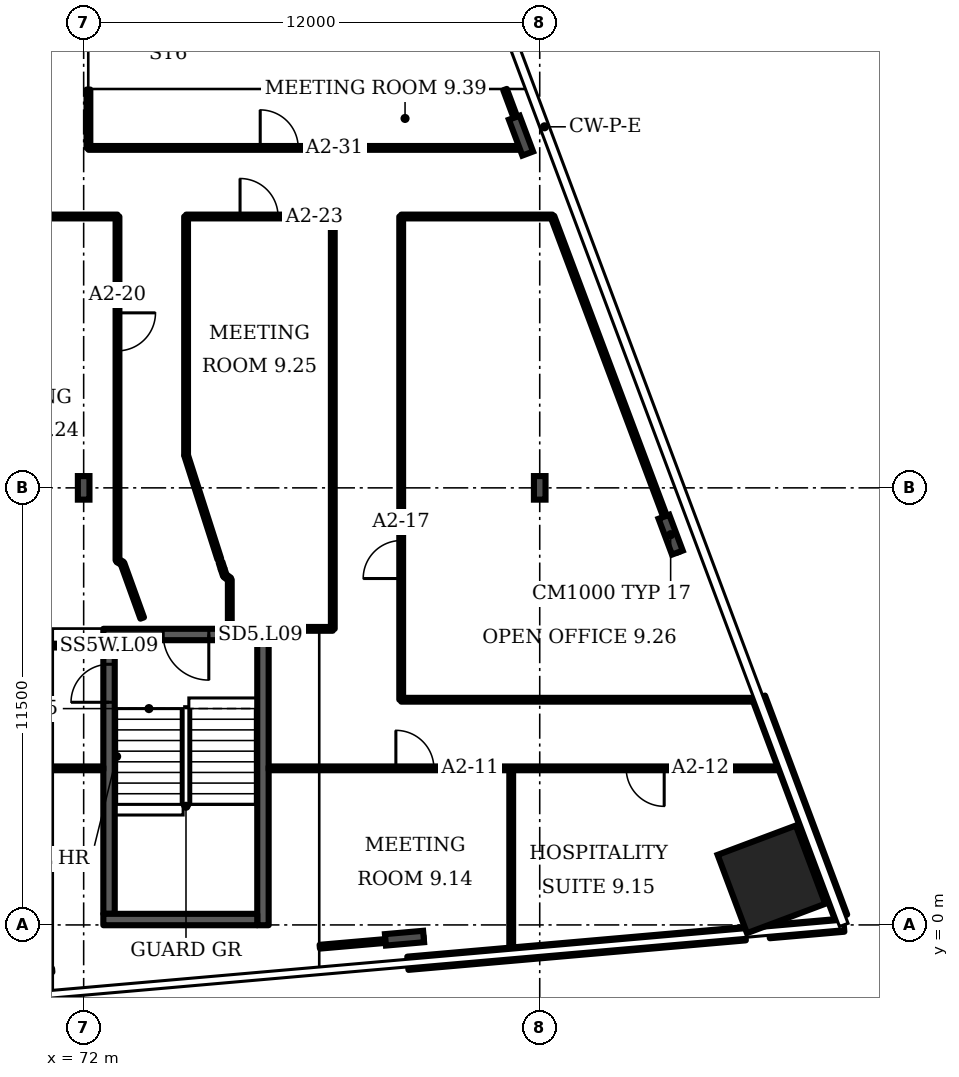
"""IFC4 building model, lengths in metres.
Left out: names, types, materials, properties, quantities, classifications, styles, units other than length and angle.
Written with IfcOpenShell. Run it as: python <this file> out.ifc"""

import sys

from ifc_helpers import new_model, si_unit, direction, frame, frame_2d, origin, origin_2d, place, context, subcontext, project, spatial, rectangle, i_section, extrude, element, fill, save


model = new_model("IFC4")
c1 = context("Model", 3, precision=1e-05, world=origin(), true_north=direction((0.0, 1.0)))
c2 = subcontext(c1, "Body", "Model", "MODEL_VIEW")
j1 = project(units=[si_unit("LENGTHUNIT", "METRE"), si_unit("PLANEANGLEUNIT", "RADIAN")], contexts=[c1])
p1 = place(None, origin())
s1 = spatial("IfcSite", under=j1, at=p1, CompositionType="ELEMENT")
p2 = place(p1, origin())
s2 = spatial("IfcBuilding", under=s1, at=p2, CompositionType="ELEMENT")
p3 = place(p2, frame((0.0, 0.0, 52.3)))
s3 = spatial("IfcBuildingStorey", under=s2, at=p3, CompositionType="ELEMENT", Elevation=52.3)
p4 = place(p3, frame((90.096, 1.2, 0.0), z_axis=(0.0, 0.0, 1.0), x_axis=(-0.351123, 0.936328, 0.0)))
e1 = element("IfcColumn", 1, at=p4, inside=s3, PredefinedType="COLUMN", context=c2, shape_type="SweptSolid", body=[
    extrude(rectangle(XDim=2.2, YDim=2.2, at=origin_2d()), origin(), (0.0, 0.0, 1.0), 3.6),
])
for number, where, z_axis, x_axis in (
    (2, (80.442, -0.349, 0.0), (0.0, 0.0, 1.0), (0.087, -0.996, 0.0)),
    (3, (87.445, 10.268, 0.0), (0.0, 0.0, 1.0), (0.936, 0.351, 0.0)),
    (4, (83.507, 20.768, 0.0), (0.0, 0.0, 1.0), (0.936, 0.351, 0.0)),
):
    element("IfcColumn", number, at=place(p3, frame(where, z_axis=z_axis, x_axis=x_axis)), inside=s3, PredefinedType="COLUMN", context=c2, shape_type="SweptSolid", body=[
        extrude(i_section(OverallWidth=0.302, OverallDepth=1.008, WebThickness=0.021, FlangeThickness=0.04, FilletRadius=0.03, at=origin_2d()), origin(), (0.0, 0.0, 1.0), 3.6),
    ])
for number, where, z_axis, x_axis in (
    (5, (72.0, 11.5, 0.0), (0.0, 0.0, 1.0), (1.0, 0.0, 0.0)),
    (6, (84.0, 11.5, 0.0), (0.0, 0.0, 1.0), (1.0, 0.0, 0.0)),
):
    element("IfcColumn", number, at=place(p3, frame(where, z_axis=z_axis, x_axis=x_axis)), inside=s3, PredefinedType="COLUMN", context=c2, shape_type="SweptSolid", body=[
        extrude(i_section(OverallWidth=0.305, OverallDepth=0.62, WebThickness=0.021, FlangeThickness=0.04, FilletRadius=0.027, at=origin_2d()), origin(), (0.0, 0.0, 1.0), 3.6),
    ])
p5 = place(p3, frame((80.53, -1.009, 0.0), z_axis=(0.0, 0.0, 1.0), x_axis=(0.996198, 0.087169, 0.0)))
e7 = element("IfcWall", 7, at=p5, inside=s3, PredefinedType="SOLIDWALL", context=c2, shape_type="SweptSolid", body=[
    extrude(rectangle(XDim=8.912, YDim=0.35, at=frame_2d((4.456, 0.0))), origin(), (0.0, 0.0, 1.0), 1.0),
])
p6 = place(p3, frame((90.039, -0.177, 0.0), z_axis=(0.0, 0.0, 1.0), x_axis=(0.996193, 0.08717, 0.0)))
e8 = element("IfcWall", 8, at=p6, inside=s3, PredefinedType="SOLIDWALL", context=c2, shape_type="SweptSolid", body=[
    extrude(rectangle(XDim=1.969, YDim=0.35, at=frame_2d((0.984, 0.0))), origin(), (0.0, 0.0, 1.0), 1.0),
])
p7 = place(p3, frame((91.926, 0.211, 0.0), z_axis=(0.0, 0.0, 1.0), x_axis=(-0.351118, 0.936328, 0.0)))
e9 = element("IfcWall", 9, at=p7, inside=s3, PredefinedType="SOLIDWALL", context=c2, shape_type="SweptSolid", body=[
    extrude(rectangle(XDim=6.154, YDim=0.35, at=frame_2d((3.077, 0.0))), origin(), (0.0, 0.0, 1.0), 1.0),
])
p8 = place(p3, frame((72.518, 7.642, 0.0), z_axis=(0.0, 0.0, 1.0), x_axis=(1.0, 0.0, 0.0)))
e10 = element("IfcWall", 10, at=p8, inside=s3, PredefinedType="SHEAR", context=c2, shape_type="SweptSolid", body=[
    extrude(rectangle(XDim=4.35, YDim=0.3, at=frame_2d((2.175, 0.0))), origin(), (0.0, 0.0, 1.0), 3.2),
])
p9 = place(p8, frame((1.575, 0.0, 0.0)))
e11 = element("IfcOpeningElement", 11, at=p9, cuts=e10, PredefinedType="OPENING", context=c2, shape_type="SweptSolid", body=[
    extrude(rectangle(XDim=1.2, YDim=2.1, at=frame_2d((0.6, 1.05))), frame((0.0, 0.16, 0.0), z_axis=(0.0, -1.0, 0.0), x_axis=(1.0, 0.0, 0.0)), (0.0, 0.0, 1.0), 0.32),
])
p10 = place(p3, frame((72.667, 0.292, 0.0), z_axis=(0.0, 0.0, 1.0), x_axis=(0.0, 1.0, 0.0)))
e12 = element("IfcWall", 12, at=p10, inside=s3, PredefinedType="SHEAR", context=c2, shape_type="SweptSolid", body=[
    extrude(rectangle(XDim=7.2, YDim=0.3, at=frame_2d((3.6, 0.0))), origin(), (0.0, 0.0, 1.0), 3.2),
])
p11 = place(p10, frame((5.566, 0.0, 0.0)))
e13 = element("IfcOpeningElement", 13, at=p11, cuts=e12, PredefinedType="OPENING", context=c2, shape_type="SweptSolid", body=[
    extrude(rectangle(XDim=1.0, YDim=2.1, at=frame_2d((0.5, 1.05))), frame((0.0, 0.16, 0.0), z_axis=(0.0, -1.0, 0.0), x_axis=(1.0, 0.0, 0.0)), (0.0, 0.0, 1.0), 0.32),
])
p12 = place(p3, frame((39.55, 18.64, 0.0), z_axis=(0.0, 0.0, 1.0), x_axis=(1.0, 0.0, 0.0)))
e14 = element("IfcWall", 14, at=p12, inside=s3, PredefinedType="PARTITIONING", context=c2, shape_type="SweptSolid", body=[
    extrude(rectangle(XDim=33.34, YDim=0.1, at=frame_2d((16.67, 0.0))), origin(), (0.0, 0.0, 1.0), 3.2),
])
p13 = place(p12, frame((4.645, 0.0, 0.0)))
e15 = element("IfcOpeningElement", 15, at=p13, cuts=e14, PredefinedType="OPENING", context=c2, shape_type="SweptSolid", body=[
    extrude(rectangle(XDim=1.0, YDim=2.1, at=frame_2d((0.5, 1.05))), frame((0.0, 0.06, 0.0), z_axis=(0.0, -1.0, 0.0), x_axis=(1.0, 0.0, 0.0)), (0.0, 0.0, 1.0), 0.12),
])
p14 = place(p3, frame((41.558, 4.12, 0.0), z_axis=(0.0, 0.0, 1.0), x_axis=(1.0, 0.0, 0.0)))
e16 = element("IfcWall", 16, at=p14, inside=s3, PredefinedType="PARTITIONING", context=c2, shape_type="SweptSolid", body=[
    extrude(rectangle(XDim=30.959, YDim=0.1, at=frame_2d((15.479, 0.0))), origin(), (0.0, 0.0, 1.0), 3.2),
])
p15 = place(p14, frame((2.952, 0.0, 0.0)))
e17 = element("IfcOpeningElement", 17, at=p15, cuts=e16, PredefinedType="OPENING", context=c2, shape_type="SweptSolid", body=[
    extrude(rectangle(XDim=1.0, YDim=2.1, at=frame_2d((0.5, 1.05))), frame((0.0, 0.06, 0.0), z_axis=(0.0, -1.0, 0.0), x_axis=(1.0, 0.0, 0.0)), (0.0, 0.0, 1.0), 0.12),
])
p16 = place(p14, frame((7.387, 0.0, 0.0)))
e18 = element("IfcOpeningElement", 18, at=p16, cuts=e16, PredefinedType="OPENING", context=c2, shape_type="SweptSolid", body=[
    extrude(rectangle(XDim=1.0, YDim=2.1, at=frame_2d((0.5, 1.05))), frame((0.0, 0.06, 0.0), z_axis=(0.0, -1.0, 0.0), x_axis=(1.0, 0.0, 0.0)), (0.0, 0.0, 1.0), 0.12),
])
p17 = place(p14, frame((15.417, 0.0, 0.0)))
e19 = element("IfcOpeningElement", 19, at=p17, cuts=e16, PredefinedType="OPENING", context=c2, shape_type="SweptSolid", body=[
    extrude(rectangle(XDim=1.0, YDim=2.1, at=frame_2d((0.5, 1.05))), frame((0.0, 0.06, 0.0), z_axis=(0.0, -1.0, 0.0), x_axis=(1.0, 0.0, 0.0)), (0.0, 0.0, 1.0), 0.12),
])
p18 = place(p14, frame((25.117, 0.0, 0.0)))
e20 = element("IfcOpeningElement", 20, at=p18, cuts=e16, PredefinedType="OPENING", context=c2, shape_type="SweptSolid", body=[
    extrude(rectangle(XDim=1.0, YDim=2.1, at=frame_2d((0.5, 1.05))), frame((0.0, 0.06, 0.0), z_axis=(0.0, -1.0, 0.0), x_axis=(1.0, 0.0, 0.0)), (0.0, 0.0, 1.0), 0.12),
])
p19 = place(p3, frame((68.445, -1.43, 0.0), z_axis=(0.0, 0.0, 1.0), x_axis=(0.996195, 0.087118, 0.0)))
e21 = element("IfcWall", 21, at=p19, inside=s3, PredefinedType="PARTITIONING", context=c2, shape_type="SweptSolid", body=[
    extrude(rectangle(XDim=2.738, YDim=0.1, at=frame_2d((1.369, 0.0))), origin(), (0.0, 0.0, 1.0), 2.58),
])
p20 = place(p3, frame((69.765, 7.35, 0.0), z_axis=(0.0, 0.0, 1.0), x_axis=(1.0, 0.0, 0.0)))
e22 = element("IfcWall", 22, at=p20, inside=s3, PredefinedType="PARTITIONING", context=c2, shape_type="SweptSolid", body=[
    extrude(rectangle(XDim=2.753, YDim=0.1, at=frame_2d((1.376, 0.0))), origin(), (0.0, 0.0, 1.0), 3.2),
])
p21 = place(p3, frame((72.125, 20.445, 0.0), z_axis=(0.0, 0.0, 1.0), x_axis=(0.0, 1.0, 0.0)))
e23 = element("IfcWall", 23, at=p21, inside=s3, PredefinedType="PARTITIONING", context=c2, shape_type="SweptSolid", body=[
    extrude(rectangle(XDim=1.535, YDim=0.1, at=frame_2d((0.768, 0.0))), origin(), (0.0, 0.0, 1.0), 3.2),
])
p22 = place(p3, frame((72.125, 20.445, 0.0), z_axis=(0.0, 0.0, 1.0), x_axis=(1.0, 0.0, 0.0)))
e24 = element("IfcWall", 24, at=p22, inside=s3, PredefinedType="PARTITIONING", context=c2, shape_type="SweptSolid", body=[
    extrude(rectangle(XDim=11.535, YDim=0.1, at=frame_2d((5.768, 0.0))), origin(), (0.0, 0.0, 1.0), 3.2),
])
p23 = place(p22, frame((4.521, 0.0, 0.0)))
e25 = element("IfcOpeningElement", 25, at=p23, cuts=e24, PredefinedType="OPENING", context=c2, shape_type="SweptSolid", body=[
    extrude(rectangle(XDim=1.0, YDim=2.1, at=frame_2d((0.5, 1.05))), frame((0.0, 0.06, 0.0), z_axis=(0.0, -1.0, 0.0), x_axis=(1.0, 0.0, 0.0)), (0.0, 0.0, 1.0), 0.12),
])
p24 = place(p3, frame((72.89, 9.59, 0.0), z_axis=(0.0, 0.0, 1.0), x_axis=(0.0, 1.0, 0.0)))
e26 = element("IfcWall", 26, at=p24, inside=s3, PredefinedType="PARTITIONING", context=c2, shape_type="SweptSolid", body=[
    extrude(rectangle(XDim=9.05, YDim=0.1, at=frame_2d((4.525, 0.0))), origin(), (0.0, 0.0, 1.0), 3.2),
])
p25 = place(p24, frame((5.515, 0.0, 0.0)))
e27 = element("IfcOpeningElement", 27, at=p25, cuts=e26, PredefinedType="OPENING", context=c2, shape_type="SweptSolid", body=[
    extrude(rectangle(XDim=1.0, YDim=2.1, at=frame_2d((0.5, 1.05))), frame((0.0, 0.06, 0.0), z_axis=(0.0, -1.0, 0.0), x_axis=(1.0, 0.0, 0.0)), (0.0, 0.0, 1.0), 0.12),
])
p26 = place(p3, frame((73.02, 9.515, 0.0), z_axis=(0.0, 0.0, 1.0), x_axis=(-0.865836, 0.500333, 0.0)))
e28 = element("IfcWall", 28, at=p26, inside=s3, PredefinedType="PARTITIONING", context=c2, shape_type="SweptSolid", body=[
    extrude(rectangle(XDim=0.15, YDim=0.1, at=frame_2d((0.075, 0.0))), origin(), (0.0, 0.0, 1.0), 3.2),
])
p27 = place(p3, frame((73.54, 8.075, 0.0), z_axis=(0.0, 0.0, 1.0), x_axis=(-0.339669, 0.940548, 0.0)))
e29 = element("IfcWall", 29, at=p27, inside=s3, PredefinedType="PARTITIONING", context=c2, shape_type="SweptSolid", body=[
    extrude(rectangle(XDim=1.531, YDim=0.1, at=frame_2d((0.766, 0.0))), origin(), (0.0, 0.0, 1.0), 3.2),
])
p28 = place(p3, frame((74.695, 12.36, 0.0), z_axis=(0.0, 0.0, 1.0), x_axis=(0.0, 1.0, 0.0)))
e30 = element("IfcWall", 30, at=p28, inside=s3, PredefinedType="PARTITIONING", context=c2, shape_type="SweptSolid", body=[
    extrude(rectangle(XDim=6.28, YDim=0.1, at=frame_2d((3.14, 0.0))), origin(), (0.0, 0.0, 1.0), 3.2),
])
p29 = place(p3, frame((74.695, 18.64, 0.0), z_axis=(0.0, 0.0, 1.0), x_axis=(1.0, 0.0, 0.0)))
e31 = element("IfcWall", 31, at=p29, inside=s3, PredefinedType="PARTITIONING", context=c2, shape_type="SweptSolid", body=[
    extrude(rectangle(XDim=3.86, YDim=0.1, at=frame_2d((1.93, 0.0))), origin(), (0.0, 0.0, 1.0), 3.2),
])
p30 = place(p29, frame((1.42, 0.0, 0.0)))
e32 = element("IfcOpeningElement", 32, at=p30, cuts=e31, PredefinedType="OPENING", context=c2, shape_type="SweptSolid", body=[
    extrude(rectangle(XDim=1.0, YDim=2.1, at=frame_2d((0.5, 1.05))), frame((0.0, 0.06, 0.0), z_axis=(0.0, -1.0, 0.0), x_axis=(1.0, 0.0, 0.0)), (0.0, 0.0, 1.0), 0.12),
])
p31 = place(p3, frame((75.57, 9.625, 0.0), z_axis=(0.0, 0.0, 1.0), x_axis=(-0.305088, 0.952327, 0.0)))
e33 = element("IfcWall", 33, at=p31, inside=s3, PredefinedType="PARTITIONING", context=c2, shape_type="SweptSolid", body=[
    extrude(rectangle(XDim=2.872, YDim=0.1, at=frame_2d((1.436, 0.0))), origin(), (0.0, 0.0, 1.0), 3.2),
])
p32 = place(p3, frame((75.655, 9.37, 0.0), z_axis=(0.0, 0.0, 1.0), x_axis=(-0.299793, 0.954008, 0.0)))
e34 = element("IfcWall", 34, at=p32, inside=s3, PredefinedType="PARTITIONING", context=c2, shape_type="SweptSolid", body=[
    extrude(rectangle(XDim=0.183, YDim=0.1, at=frame_2d((0.092, 0.0))), origin(), (0.0, 0.0, 1.0), 3.2),
])
p33 = place(p3, frame((75.715, 9.19, 0.0), z_axis=(0.0, 0.0, 1.0), x_axis=(-0.316228, 0.948684, 0.0)))
e35 = element("IfcWall", 35, at=p33, inside=s3, PredefinedType="PARTITIONING", context=c2, shape_type="SweptSolid", body=[
    extrude(rectangle(XDim=0.19, YDim=0.1, at=frame_2d((0.095, 0.0))), origin(), (0.0, 0.0, 1.0), 3.2),
])
p34 = place(p3, frame((75.845, 7.812, 0.0), z_axis=(0.0, 0.0, 1.0), x_axis=(0.0, 1.0, 0.0)))
e36 = element("IfcWall", 36, at=p34, inside=s3, PredefinedType="PARTITIONING", context=c2, shape_type="SweptSolid", body=[
    extrude(rectangle(XDim=1.278, YDim=0.1, at=frame_2d((0.639, 0.0))), origin(), (0.0, 0.0, 1.0), 3.2),
])
p35 = place(p3, frame((75.845, 9.095, 0.0), z_axis=(0.0, 0.0, 1.0), x_axis=(-0.807226, 0.590246, 0.0)))
e37 = element("IfcWall", 37, at=p35, inside=s3, PredefinedType="PARTITIONING", context=c2, shape_type="SweptSolid", body=[
    extrude(rectangle(XDim=0.161, YDim=0.1, at=frame_2d((0.081, 0.0))), origin(), (0.0, 0.0, 1.0), 3.2),
])
p36 = place(p3, frame((76.867, 4.12, 0.0), z_axis=(0.0, 0.0, 1.0), x_axis=(1.0, 0.0, 0.0)))
e38 = element("IfcWall", 38, at=p36, inside=s3, PredefinedType="PARTITIONING", context=c2, shape_type="SweptSolid", body=[
    extrude(rectangle(XDim=13.566, YDim=0.1, at=frame_2d((6.783, 0.0))), origin(), (0.0, 0.0, 1.0), 2.58),
])
p37 = place(p36, frame((3.347, 0.0, 0.0)))
e39 = element("IfcOpeningElement", 39, at=p37, cuts=e38, PredefinedType="OPENING", context=c2, shape_type="SweptSolid", body=[
    extrude(rectangle(XDim=1.0, YDim=2.1, at=frame_2d((0.5, 1.05))), frame((0.0, 0.06, 0.0), z_axis=(0.0, -1.0, 0.0), x_axis=(1.0, 0.0, 0.0)), (0.0, 0.0, 1.0), 0.12),
])
p38 = place(p36, frame((9.407, 0.0, 0.0)))
e40 = element("IfcOpeningElement", 40, at=p38, cuts=e38, PredefinedType="OPENING", context=c2, shape_type="SweptSolid", body=[
    extrude(rectangle(XDim=1.0, YDim=2.1, at=frame_2d((0.5, 1.05))), frame((0.0, 0.06, 0.0), z_axis=(0.0, -1.0, 0.0), x_axis=(1.0, 0.0, 0.0)), (0.0, 0.0, 1.0), 0.12),
])
p39 = place(p3, frame((76.867, 7.79, 0.0), z_axis=(0.0, 0.0, 1.0), x_axis=(1.0, 0.0, 0.0)))
e41 = element("IfcWall", 41, at=p39, inside=s3, PredefinedType="PARTITIONING", context=c2, shape_type="SweptSolid", body=[
    extrude(rectangle(XDim=1.688, YDim=0.1, at=frame_2d((0.844, 0.0))), origin(), (0.0, 0.0, 1.0), 3.2),
])
p40 = place(p3, frame((78.212, -0.573, 0.0), z_axis=(0.0, 0.0, 1.0), x_axis=(0.996224, 0.086779, 0.0)))
e42 = element("IfcWall", 42, at=p40, inside=s3, PredefinedType="PARTITIONING", context=c2, shape_type="SweptSolid", body=[
    extrude(rectangle(XDim=2.743, YDim=0.1, at=frame_2d((1.372, 0.0))), origin(), (0.0, 0.0, 1.0), 2.58),
])
p41 = place(p3, frame((78.555, 7.79, 0.0), z_axis=(0.0, 0.0, 1.0), x_axis=(0.0, 1.0, 0.0)))
e43 = element("IfcWall", 43, at=p41, inside=s3, PredefinedType="PARTITIONING", context=c2, shape_type="SweptSolid", body=[
    extrude(rectangle(XDim=10.85, YDim=0.1, at=frame_2d((5.425, 0.0))), origin(), (0.0, 0.0, 1.0), 3.2),
])
p42 = place(p3, frame((80.355, 5.925, 0.0), z_axis=(0.0, 0.0, 1.0), x_axis=(0.0, 1.0, 0.0)))
e44 = element("IfcWall", 44, at=p42, inside=s3, PredefinedType="PARTITIONING", context=c2, shape_type="SweptSolid", body=[
    extrude(rectangle(XDim=12.715, YDim=0.1, at=frame_2d((6.357, 0.0))), origin(), (0.0, 0.0, 1.0), 3.2),
])
p43 = place(p42, frame((3.19, 0.0, 0.0)))
e45 = element("IfcOpeningElement", 45, at=p43, cuts=e44, PredefinedType="OPENING", context=c2, shape_type="SweptSolid", body=[
    extrude(rectangle(XDim=1.0, YDim=2.1, at=frame_2d((0.5, 1.05))), frame((0.0, 0.06, 0.0), z_axis=(0.0, -1.0, 0.0), x_axis=(1.0, 0.0, 0.0)), (0.0, 0.0, 1.0), 0.12),
])
p44 = place(p3, frame((80.355, 5.925, 0.0), z_axis=(0.0, 0.0, 1.0), x_axis=(1.0, 0.0, 0.0)))
e46 = element("IfcWall", 46, at=p44, inside=s3, PredefinedType="PARTITIONING", context=c2, shape_type="SweptSolid", body=[
    extrude(rectangle(XDim=9.402, YDim=0.1, at=frame_2d((4.701, 0.0))), origin(), (0.0, 0.0, 1.0), 2.58),
])
p45 = place(p3, frame((80.355, 18.64, 0.0), z_axis=(0.0, 0.0, 1.0), x_axis=(1.0, 0.0, 0.0)))
e47 = element("IfcWall", 47, at=p45, inside=s3, PredefinedType="PARTITIONING", context=c2, shape_type="SweptSolid", body=[
    extrude(rectangle(XDim=3.98, YDim=0.1, at=frame_2d((1.99, 0.0))), origin(), (0.0, 0.0, 1.0), 3.2),
])
p46 = place(p3, frame((83.25, -0.745, 0.0), z_axis=(0.0, 0.0, 1.0), x_axis=(0.0, 1.0, 0.0)))
e48 = element("IfcWall", 48, at=p46, inside=s3, PredefinedType="PARTITIONING", context=c2, shape_type="SweptSolid", body=[
    extrude(rectangle(XDim=4.865, YDim=0.1, at=frame_2d((2.433, 0.0))), origin(), (0.0, 0.0, 1.0), 2.58),
])
p47 = place(p3, frame((83.66, 20.445, 0.0), z_axis=(0.0, 0.0, 1.0), x_axis=(-0.349474, 0.936948, 0.0)))
e49 = element("IfcWall", 49, at=p47, inside=s3, PredefinedType="PARTITIONING", context=c2, shape_type="SweptSolid", body=[
    extrude(rectangle(XDim=1.638, YDim=0.1, at=frame_2d((0.819, 0.0))), origin(), (0.0, 0.0, 1.0), 2.58),
])
p48 = place(p3, frame((87.65, 9.81, 0.0), z_axis=(0.0, 0.0, 1.0), x_axis=(-0.351473, 0.9362, 0.0)))
e50 = element("IfcWall", 50, at=p48, inside=s3, PredefinedType="PARTITIONING", context=c2, shape_type="SweptSolid", body=[
    extrude(rectangle(XDim=9.432, YDim=0.1, at=frame_2d((4.716, 0.0))), origin(), (0.0, 0.0, 1.0), 2.58),
])
p49 = place(p3, frame((72.817, 7.354, 0.0), z_axis=(0.0, 0.0, 1.0), x_axis=(0.999994, 0.002027, 0.0)))
e51 = element("IfcWall", 51, at=p49, inside=s3, PredefinedType="PARTITIONING", context=c2, shape_type="SweptSolid", body=[
    extrude(rectangle(XDim=0.723, YDim=0.1, at=frame_2d((0.361, 0.0))), origin(), (0.0, 0.0, 1.0), 3.2),
])
p50 = place(p3, frame((76.718, -0.008, 0.0), z_axis=(0.0, 0.0, 1.0), x_axis=(0.0, 1.0, 0.0)))
e52 = element("IfcWall", 52, at=p50, inside=s3, PredefinedType="SHEAR", context=c2, shape_type="SweptSolid", body=[
    extrude(rectangle(XDim=7.5, YDim=0.3, at=frame_2d((3.75, 0.0))), origin(), (0.0, 0.0, 1.0), 3.2),
])
p51 = place(p3, frame((72.518, 0.142, 0.0), z_axis=(0.0, 0.0, 1.0), x_axis=(1.0, 0.0, 0.0)))
e53 = element("IfcWall", 53, at=p51, inside=s3, PredefinedType="SHEAR", context=c2, shape_type="SweptSolid", body=[
    extrude(rectangle(XDim=4.05, YDim=0.3, at=frame_2d((2.025, 0.0))), origin(), (0.0, 0.0, 1.0), 3.2),
])
p52 = place(p11, origin())
e54 = element("IfcDoor", 54, at=p52, inside=s3, OperationType="SINGLE_SWING_LEFT", PredefinedType="DOOR", context=c2, shape_type="SweptSolid", body=[
    extrude(rectangle(XDim=1.0, YDim=2.1, at=frame_2d((0.5, 1.05))), frame((0.0, 0.025, 0.0), z_axis=(0.0, -1.0, 0.0), x_axis=(1.0, 0.0, 0.0)), (0.0, 0.0, 1.0), 0.05),
])
fill(e13, e54)
p53 = place(p9, origin())
e55 = element("IfcDoor", 55, at=p53, inside=s3, OperationType="SINGLE_SWING_RIGHT", PredefinedType="DOOR", context=c2, shape_type="SweptSolid", body=[
    extrude(rectangle(XDim=1.2, YDim=2.1, at=frame_2d((0.6, 1.05))), frame((0.0, 0.025, 0.0), z_axis=(0.0, -1.0, 0.0), x_axis=(1.0, 0.0, 0.0)), (0.0, 0.0, 1.0), 0.05),
])
fill(e11, e55)
p54 = place(p37, origin())
e56 = element("IfcDoor", 56, at=p54, inside=s3, OperationType="SINGLE_SWING_LEFT", PredefinedType="DOOR", context=c2, shape_type="SweptSolid", body=[
    extrude(rectangle(XDim=1.0, YDim=2.1, at=frame_2d((0.5, 1.05))), frame((0.0, 0.025, 0.0), z_axis=(0.0, -1.0, 0.0), x_axis=(1.0, 0.0, 0.0)), (0.0, 0.0, 1.0), 0.05),
])
fill(e39, e56)
p55 = place(p38, origin())
e57 = element("IfcDoor", 57, at=p55, inside=s3, OperationType="SINGLE_SWING_RIGHT", PredefinedType="DOOR", context=c2, shape_type="SweptSolid", body=[
    extrude(rectangle(XDim=1.0, YDim=2.1, at=frame_2d((0.5, 1.05))), frame((0.0, 0.025, 0.0), z_axis=(0.0, -1.0, 0.0), x_axis=(1.0, 0.0, 0.0)), (0.0, 0.0, 1.0), 0.05),
])
fill(e40, e57)
p56 = place(p43, origin())
e58 = element("IfcDoor", 58, at=p56, inside=s3, OperationType="SINGLE_SWING_LEFT", PredefinedType="DOOR", context=c2, shape_type="SweptSolid", body=[
    extrude(rectangle(XDim=1.0, YDim=2.1, at=frame_2d((0.5, 1.05))), frame((0.0, 0.025, 0.0), z_axis=(0.0, -1.0, 0.0), x_axis=(1.0, 0.0, 0.0)), (0.0, 0.0, 1.0), 0.05),
])
fill(e45, e58)
p57 = place(p25, origin())
e59 = element("IfcDoor", 59, at=p57, inside=s3, OperationType="SINGLE_SWING_RIGHT", PredefinedType="DOOR", context=c2, shape_type="SweptSolid", body=[
    extrude(rectangle(XDim=1.0, YDim=2.1, at=frame_2d((0.5, 1.05))), frame((0.0, 0.025, 0.0), z_axis=(0.0, -1.0, 0.0), x_axis=(1.0, 0.0, 0.0)), (0.0, 0.0, 1.0), 0.05),
])
fill(e27, e59)
p58 = place(p30, origin())
e60 = element("IfcDoor", 60, at=p58, inside=s3, OperationType="SINGLE_SWING_LEFT", PredefinedType="DOOR", context=c2, shape_type="SweptSolid", body=[
    extrude(rectangle(XDim=1.0, YDim=2.1, at=frame_2d((0.5, 1.05))), frame((0.0, 0.025, 0.0), z_axis=(0.0, -1.0, 0.0), x_axis=(1.0, 0.0, 0.0)), (0.0, 0.0, 1.0), 0.05),
])
fill(e32, e60)
p59 = place(p23, origin())
e61 = element("IfcDoor", 61, at=p59, inside=s3, OperationType="SINGLE_SWING_LEFT", PredefinedType="DOOR", context=c2, shape_type="SweptSolid", body=[
    extrude(rectangle(XDim=1.0, YDim=2.1, at=frame_2d((0.5, 1.05))), frame((0.0, 0.025, 0.0), z_axis=(0.0, -1.0, 0.0), x_axis=(1.0, 0.0, 0.0)), (0.0, 0.0, 1.0), 0.05),
])
fill(e25, e61)
save(model, sys.argv[1])
